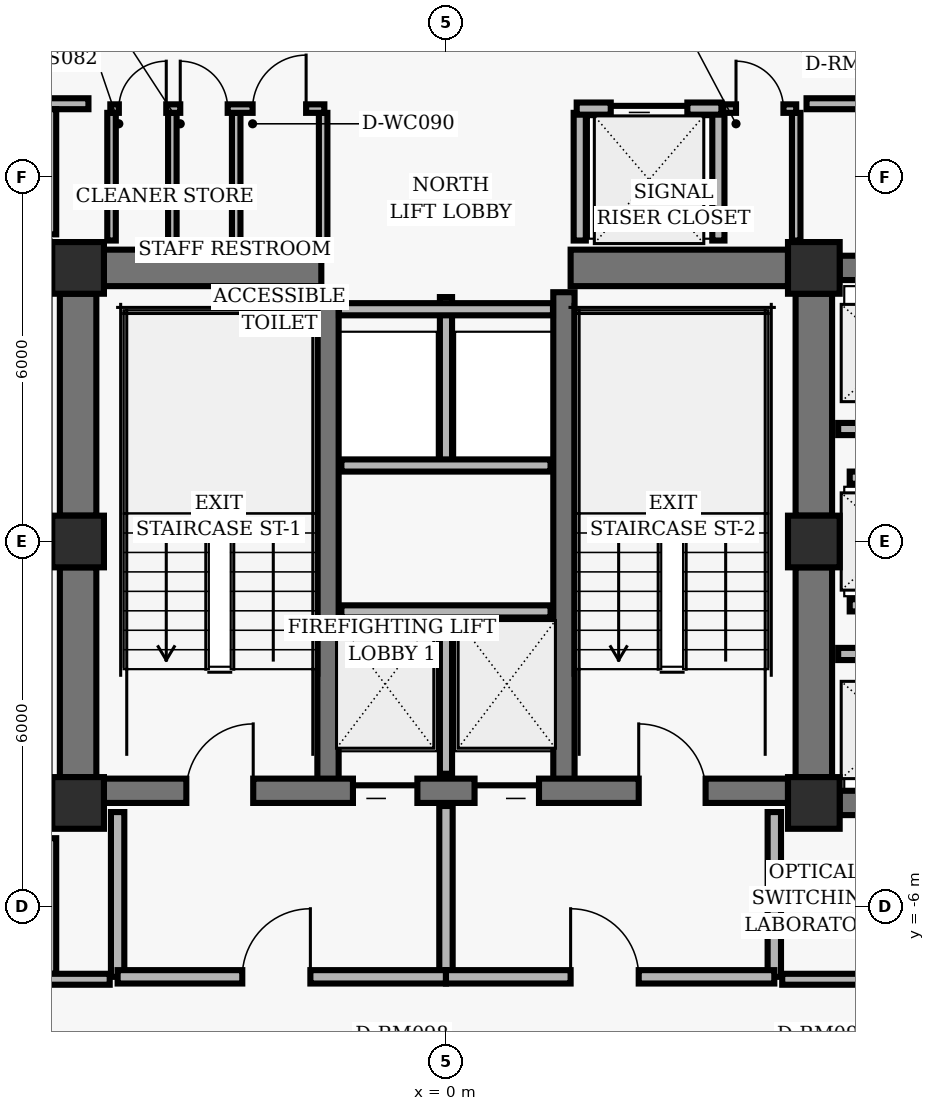
"""IFC4 building model, lengths in metres.
Left out: names, types, materials, properties, quantities, classifications, styles, units other than length and angle.
Written with IfcOpenShell. Run it as: python <this file> out.ifc"""

import sys

from ifc_helpers import new_model, si_unit, direction, frame, frame_2d, origin, origin_2d, place, context, subcontext, project, spatial, rectangle, hollow_rectangle, extrude, element, fill, save


model = new_model("IFC4")
c1 = context("Model", 3, precision=1e-05, world=origin(), true_north=direction((0.0, 1.0)))
c2 = subcontext(c1, "Body", "Model", "MODEL_VIEW")
j1 = project(units=[si_unit("LENGTHUNIT", "METRE"), si_unit("PLANEANGLEUNIT", "RADIAN")], contexts=[c1])
p1 = place(None, origin())
s1 = spatial("IfcSite", under=j1, at=p1, CompositionType="ELEMENT")
p2 = place(p1, origin())
s2 = spatial("IfcBuilding", under=s1, at=p2, CompositionType="ELEMENT")
p3 = place(p2, frame((0.0, 0.0, 147.2)))
s3 = spatial("IfcBuildingStorey", under=s2, at=p3, CompositionType="ELEMENT", Elevation=147.2)
for number, where, z_axis, x_axis in (
    (1, (-6.05, 4.5, 0.0), (0.0, 0.0, 1.0), (1.0, 0.0, 0.0)),
    (2, (6.05, 4.5, 0.0), (0.0, 0.0, 1.0), (1.0, 0.0, 0.0)),
    (3, (-6.05, 0.0, 0.0), (0.0, 0.0, 1.0), (1.0, 0.0, 0.0)),
    (4, (6.05, 0.0, 0.0), (0.0, 0.0, 1.0), (1.0, 0.0, 0.0)),
    (5, (-6.05, -4.3, 0.0), (0.0, 0.0, 1.0), (1.0, 0.0, 0.0)),
    (6, (6.05, -4.3, 0.0), (0.0, 0.0, 1.0), (1.0, 0.0, 0.0)),
):
    element("IfcColumn", number, at=place(p3, frame(where, z_axis=z_axis, x_axis=x_axis)), inside=s3, PredefinedType="COLUMN", context=c2, shape_type="SweptSolid", body=[
        extrude(hollow_rectangle(XDim=0.85, YDim=0.85, WallThickness=0.055, InnerFilletRadius=0.02, OuterFilletRadius=0.04, at=origin_2d()), origin(), (0.0, 0.0, 1.0), 3.04),
    ])
p4 = place(p3, frame((-6.05, 0.425, 0.0), z_axis=(0.0, 0.0, 1.0), x_axis=(0.0, 1.0, 0.0)))
e7 = element("IfcWall", 7, at=p4, inside=s3, PredefinedType="SHEAR", context=c2, shape_type="SweptSolid", body=[
    extrude(rectangle(XDim=3.65, YDim=0.6, at=frame_2d((1.825, 0.0))), origin(), (0.0, 0.0, 1.0), 2.788),
])
p5 = place(p3, frame((-6.05, -3.875, 0.0), z_axis=(0.0, 0.0, 1.0), x_axis=(0.0, 1.0, 0.0)))
e8 = element("IfcWall", 8, at=p5, inside=s3, PredefinedType="SHEAR", context=c2, shape_type="SweptSolid", body=[
    extrude(rectangle(XDim=3.45, YDim=0.6, at=frame_2d((1.725, 0.0))), origin(), (0.0, 0.0, 1.0), 2.788),
])
p6 = place(p3, frame((6.05, 0.425, 0.0), z_axis=(0.0, 0.0, 1.0), x_axis=(0.0, 1.0, 0.0)))
e9 = element("IfcWall", 9, at=p6, inside=s3, PredefinedType="SHEAR", context=c2, shape_type="SweptSolid", body=[
    extrude(rectangle(XDim=3.65, YDim=0.6, at=frame_2d((1.825, 0.0))), origin(), (0.0, 0.0, 1.0), 2.788),
])
p7 = place(p3, frame((6.05, -3.875, 0.0), z_axis=(0.0, 0.0, 1.0), x_axis=(0.0, 1.0, 0.0)))
e10 = element("IfcWall", 10, at=p7, inside=s3, PredefinedType="SHEAR", context=c2, shape_type="SweptSolid", body=[
    extrude(rectangle(XDim=3.45, YDim=0.6, at=frame_2d((1.725, 0.0))), origin(), (0.0, 0.0, 1.0), 2.788),
])
for number, where, z_axis, x_axis in (
    (11, (-1.94, -4.1, 0.0), (0.0, 0.0, 1.0), (0.0, 1.0, 0.0)),
    (12, (1.94, -4.1, 0.0), (0.0, 0.0, 1.0), (0.0, 1.0, 0.0)),
):
    element("IfcWall", number, at=place(p3, frame(where, z_axis=z_axis, x_axis=x_axis)), inside=s3, PredefinedType="SHEAR", context=c2, shape_type="SweptSolid", body=[
        extrude(rectangle(XDim=8.2, YDim=0.35, at=frame_2d((4.1, 0.0))), origin(), (0.0, 0.0, 1.0), 2.788),
    ])
p8 = place(p3, frame((-5.625, -4.1, 0.0), z_axis=(0.0, 0.0, 1.0), x_axis=(1.0, 0.0, 0.0)))
e13 = element("IfcWall", 13, at=p8, inside=s3, PredefinedType="SHEAR", context=c2, shape_type="SweptSolid", body=[
    extrude(rectangle(XDim=11.25, YDim=0.4, at=frame_2d((5.625, 0.0))), origin(), (0.0, 0.0, 1.0), 2.788),
])
p9 = place(p8, frame((1.355, 0.0, 0.0)))
e14 = element("IfcOpeningElement", 14, at=p9, cuts=e13, PredefinedType="OPENING", context=c2, shape_type="SweptSolid", body=[
    extrude(rectangle(XDim=1.1, YDim=2.04, at=frame_2d((0.55, 1.02))), frame((0.0, 0.21, 0.0), z_axis=(0.0, -1.0, 0.0), x_axis=(1.0, 0.0, 0.0)), (0.0, 0.0, 1.0), 0.42),
])
p10 = place(p8, frame((8.795, 0.0, 0.0)))
e15 = element("IfcOpeningElement", 15, at=p10, cuts=e13, PredefinedType="OPENING", context=c2, shape_type="SweptSolid", body=[
    extrude(rectangle(XDim=1.1, YDim=2.04, at=frame_2d((0.55, 1.02))), frame((0.0, 0.21, 0.0), z_axis=(0.0, -1.0, 0.0), x_axis=(1.0, 0.0, 0.0)), (0.0, 0.0, 1.0), 0.42),
])
p11 = place(p8, frame((4.095, 0.0, 0.0)))
e16 = element("IfcOpeningElement", 16, at=p11, cuts=e13, PredefinedType="OPENING", context=c2, shape_type="SweptSolid", body=[
    extrude(rectangle(XDim=1.06, YDim=2.04, at=frame_2d((0.53, 1.02))), frame((0.0, 0.21, 0.0), z_axis=(0.0, -1.0, 0.0), x_axis=(1.0, 0.0, 0.0)), (0.0, 0.0, 1.0), 0.42),
])
p12 = place(p8, frame((6.095, 0.0, 0.0)))
e17 = element("IfcOpeningElement", 17, at=p12, cuts=e13, PredefinedType="OPENING", context=c2, shape_type="SweptSolid", body=[
    extrude(rectangle(XDim=1.06, YDim=2.04, at=frame_2d((0.53, 1.02))), frame((0.0, 0.21, 0.0), z_axis=(0.0, -1.0, 0.0), x_axis=(1.0, 0.0, 0.0)), (0.0, 0.0, 1.0), 0.42),
])
for number, where, z_axis, x_axis in (
    (18, (-5.625, 4.5, 0.0), (0.0, 0.0, 1.0), (1.0, 0.0, 0.0)),
    (19, (2.05, 4.5, 0.0), (0.0, 0.0, 1.0), (1.0, 0.0, 0.0)),
):
    element("IfcWall", number, at=place(p3, frame(where, z_axis=z_axis, x_axis=x_axis)), inside=s3, PredefinedType="SHEAR", context=c2, shape_type="SweptSolid", body=[
        extrude(rectangle(XDim=3.575, YDim=0.6, at=frame_2d((1.788, 0.0))), origin(), (0.0, 0.0, 1.0), 2.788),
    ])
for number, where, z_axis, x_axis in (
    (20, (6.475, 4.5, 0.0), (0.0, 0.0, 1.0), (1.0, 0.0, 0.0)),
    (21, (6.475, -4.3, 0.0), (0.0, 0.0, 1.0), (1.0, 0.0, 0.0)),
):
    element("IfcWall", number, at=place(p3, frame(where, z_axis=z_axis, x_axis=x_axis)), inside=s3, PredefinedType="SHEAR", context=c2, shape_type="SweptSolid", body=[
        extrude(rectangle(XDim=2.05, YDim=0.4, at=frame_2d((1.025, 0.0))), origin(), (0.0, 0.0, 1.0), 2.788),
    ])
p13 = place(p3, frame((0.0, -3.82, 0.0), z_axis=(0.0, 0.0, 1.0), x_axis=(0.0, 1.0, 0.0)))
e22 = element("IfcWall", 22, at=p13, inside=s3, PredefinedType="PARTITIONING", context=c2, shape_type="SweptSolid", body=[
    extrude(rectangle(XDim=2.67, YDim=0.2, at=frame_2d((1.335, 0.0))), origin(), (0.0, 0.0, 1.0), 2.763),
])
p14 = place(p3, frame((-1.72, -1.15, 0.0), z_axis=(0.0, 0.0, 1.0), x_axis=(1.0, 0.0, 0.0)))
e23 = element("IfcWall", 23, at=p14, inside=s3, PredefinedType="PARTITIONING", context=c2, shape_type="SweptSolid", body=[
    extrude(rectangle(XDim=3.44, YDim=0.2, at=frame_2d((1.72, 0.0))), origin(), (0.0, 0.0, 1.0), 2.763),
])
for number, where, z_axis, x_axis in (
    (24, (-5.4, -7.16, 0.0), (0.0, 0.0, 1.0), (0.0, 1.0, 0.0)),
    (25, (5.4, -7.16, 0.0), (0.0, 0.0, 1.0), (0.0, 1.0, 0.0)),
):
    element("IfcWall", number, at=place(p3, frame(where, z_axis=z_axis, x_axis=x_axis)), inside=s3, PredefinedType="PARTITIONING", context=c2, shape_type="SweptSolid", body=[
        extrude(rectangle(XDim=2.71, YDim=0.22, at=frame_2d((1.355, 0.0))), origin(), (0.0, 0.0, 1.0), 2.763),
    ])
p15 = place(p3, frame((0.0, -7.16, 0.0), z_axis=(0.0, 0.0, 1.0), x_axis=(0.0, 1.0, 0.0)))
e26 = element("IfcWall", 26, at=p15, inside=s3, PredefinedType="PARTITIONING", context=c2, shape_type="SweptSolid", body=[
    extrude(rectangle(XDim=2.81, YDim=0.22, at=frame_2d((1.405, 0.0))), origin(), (0.0, 0.0, 1.0), 2.763),
])
p16 = place(p3, frame((-5.4, -7.16, 0.0), z_axis=(0.0, 0.0, 1.0), x_axis=(1.0, 0.0, 0.0)))
e27 = element("IfcWall", 27, at=p16, inside=s3, PredefinedType="PARTITIONING", context=c2, shape_type="SweptSolid", body=[
    extrude(rectangle(XDim=5.4, YDim=0.22, at=frame_2d((2.7, 0.0))), origin(), (0.0, 0.0, 1.0), 2.33),
])
p17 = place(p16, frame((2.05, 0.0, 0.0)))
e28 = element("IfcOpeningElement", 28, at=p17, cuts=e27, PredefinedType="OPENING", context=c2, shape_type="SweptSolid", body=[
    extrude(rectangle(XDim=1.12, YDim=2.02, at=frame_2d((0.56, 1.01))), frame((0.0, 0.12, 0.0), z_axis=(0.0, -1.0, 0.0), x_axis=(1.0, 0.0, 0.0)), (0.0, 0.0, 1.0), 0.24),
])
p18 = place(p3, frame((0.0, -7.16, 0.0), z_axis=(0.0, 0.0, 1.0), x_axis=(1.0, 0.0, 0.0)))
e29 = element("IfcWall", 29, at=p18, inside=s3, PredefinedType="PARTITIONING", context=c2, shape_type="SweptSolid", body=[
    extrude(rectangle(XDim=5.4, YDim=0.22, at=frame_2d((2.7, 0.0))), origin(), (0.0, 0.0, 1.0), 2.33),
])
p19 = place(p18, frame((2.05, 0.0, 0.0)))
e30 = element("IfcOpeningElement", 30, at=p19, cuts=e29, PredefinedType="OPENING", context=c2, shape_type="SweptSolid", body=[
    extrude(rectangle(XDim=1.12, YDim=2.02, at=frame_2d((0.56, 1.01))), frame((0.0, 0.12, 0.0), z_axis=(0.0, -1.0, 0.0), x_axis=(1.0, 0.0, 0.0)), (0.0, 0.0, 1.0), 0.24),
])
p20 = place(p3, frame((0.0, 1.25, 0.0), z_axis=(0.0, 0.0, 1.0), x_axis=(0.0, 1.0, 0.0)))
e31 = element("IfcWall", 31, at=p20, inside=s3, PredefinedType="PARTITIONING", context=c2, shape_type="SweptSolid", body=[
    extrude(rectangle(XDim=2.77, YDim=0.2, at=frame_2d((1.385, 0.0))), origin(), (0.0, 0.0, 1.0), 2.763),
])
p21 = place(p3, frame((-1.72, 1.25, 0.0), z_axis=(0.0, 0.0, 1.0), x_axis=(1.0, 0.0, 0.0)))
e32 = element("IfcWall", 32, at=p21, inside=s3, PredefinedType="PARTITIONING", context=c2, shape_type="SweptSolid", body=[
    extrude(rectangle(XDim=3.44, YDim=0.2, at=frame_2d((1.72, 0.0))), origin(), (0.0, 0.0, 1.0), 2.763),
])
p22 = place(p3, frame((-1.76, 3.82, 0.0), z_axis=(0.0, 0.0, 1.0), x_axis=(1.0, 0.0, 0.0)))
e33 = element("IfcWall", 33, at=p22, inside=s3, PredefinedType="PARTITIONING", context=c2, shape_type="SweptSolid", body=[
    extrude(rectangle(XDim=3.52, YDim=0.2, at=frame_2d((1.76, 0.0))), origin(), (0.0, 0.0, 1.0), 2.763),
])
for number, where, z_axis, x_axis in (
    (34, (2.2, 4.95, 0.0), (0.0, 0.0, 1.0), (0.0, 1.0, 0.0)),
    (35, (4.48, 4.95, 0.0), (0.0, 0.0, 1.0), (0.0, 1.0, 0.0)),
):
    element("IfcWall", number, at=place(p3, frame(where, z_axis=z_axis, x_axis=x_axis)), inside=s3, PredefinedType="PARTITIONING", context=c2, shape_type="SweptSolid", body=[
        extrude(rectangle(XDim=2.1, YDim=0.2, at=frame_2d((1.05, 0.0))), origin(), (0.0, 0.0, 1.0), 2.763),
    ])
p23 = place(p3, frame((2.15, 7.12, 0.0), z_axis=(0.0, 0.0, 1.0), x_axis=(1.0, 0.0, 0.0)))
e36 = element("IfcWall", 36, at=p23, inside=s3, PredefinedType="PARTITIONING", context=c2, shape_type="SweptSolid", body=[
    extrude(rectangle(XDim=2.38, YDim=0.2, at=frame_2d((1.19, 0.0))), origin(), (0.0, 0.0, 1.0), 2.763),
])
p24 = place(p23, frame((0.56, 0.0, 0.0)))
e37 = element("IfcOpeningElement", 37, at=p24, cuts=e36, PredefinedType="OPENING", context=c2, shape_type="SweptSolid", body=[
    extrude(rectangle(XDim=1.26, YDim=2.06, at=frame_2d((0.63, 1.03))), frame((0.0, 0.11, 0.0), z_axis=(0.0, -1.0, 0.0), x_axis=(1.0, 0.0, 0.0)), (0.0, 0.0, 1.0), 0.22),
])
for number, where, z_axis, x_axis in (
    (38, (-5.5, 4.95, 0.0), (0.0, 0.0, 1.0), (0.0, 1.0, 0.0)),
    (39, (-4.5, 4.95, 0.0), (0.0, 0.0, 1.0), (0.0, 1.0, 0.0)),
    (40, (-3.45, 4.95, 0.0), (0.0, 0.0, 1.0), (0.0, 1.0, 0.0)),
    (41, (-2.02, 4.95, 0.0), (0.0, 0.0, 1.0), (0.0, 1.0, 0.0)),
):
    element("IfcWall", number, at=place(p3, frame(where, z_axis=z_axis, x_axis=x_axis)), inside=s3, PredefinedType="PARTITIONING", context=c2, shape_type="SweptSolid", body=[
        extrude(rectangle(XDim=2.1, YDim=0.14, at=frame_2d((1.05, 0.0))), origin(), (0.0, 0.0, 1.0), 2.763),
    ])
p25 = place(p3, frame((-5.52, 7.12, 0.0), z_axis=(0.0, 0.0, 1.0), x_axis=(1.0, 0.0, 0.0)))
e42 = element("IfcWall", 42, at=p25, inside=s3, PredefinedType="PARTITIONING", context=c2, shape_type="SweptSolid", body=[
    extrude(rectangle(XDim=3.52, YDim=0.14, at=frame_2d((1.76, 0.0))), origin(), (0.0, 0.0, 1.0), 2.763),
])
p26 = place(p25, frame((0.14, 0.0, 0.0)))
e43 = element("IfcOpeningElement", 43, at=p26, cuts=e42, PredefinedType="OPENING", context=c2, shape_type="SweptSolid", body=[
    extrude(rectangle(XDim=0.78, YDim=2.01, at=frame_2d((0.39, 1.005))), frame((0.0, 0.08, 0.0), z_axis=(0.0, -1.0, 0.0), x_axis=(1.0, 0.0, 0.0)), (0.0, 0.0, 1.0), 0.16),
])
p27 = place(p25, frame((1.15, 0.0, 0.0)))
e44 = element("IfcOpeningElement", 44, at=p27, cuts=e42, PredefinedType="OPENING", context=c2, shape_type="SweptSolid", body=[
    extrude(rectangle(XDim=0.78, YDim=2.01, at=frame_2d((0.39, 1.005))), frame((0.0, 0.08, 0.0), z_axis=(0.0, -1.0, 0.0), x_axis=(1.0, 0.0, 0.0)), (0.0, 0.0, 1.0), 0.16),
])
p28 = place(p25, frame((2.34, 0.0, 0.0)))
e45 = element("IfcOpeningElement", 45, at=p28, cuts=e42, PredefinedType="OPENING", context=c2, shape_type="SweptSolid", body=[
    extrude(rectangle(XDim=0.88, YDim=2.02, at=frame_2d((0.44, 1.01))), frame((0.0, 0.08, 0.0), z_axis=(0.0, -1.0, 0.0), x_axis=(1.0, 0.0, 0.0)), (0.0, 0.0, 1.0), 0.16),
])
p29 = place(p3, frame((5.76, 4.95, 0.0), z_axis=(0.0, 0.0, 1.0), x_axis=(0.0, 1.0, 0.0)))
e46 = element("IfcWall", 46, at=p29, inside=s3, PredefinedType="PARTITIONING", context=c2, shape_type="SweptSolid", body=[
    extrude(rectangle(XDim=2.1, YDim=0.14, at=frame_2d((1.05, 0.0))), origin(), (0.0, 0.0, 1.0), 2.763),
])
p30 = place(p3, frame((4.56, 7.12, 0.0), z_axis=(0.0, 0.0, 1.0), x_axis=(1.0, 0.0, 0.0)))
e47 = element("IfcWall", 47, at=p30, inside=s3, PredefinedType="PARTITIONING", context=c2, shape_type="SweptSolid", body=[
    extrude(rectangle(XDim=1.2, YDim=0.14, at=frame_2d((0.6, 0.0))), origin(), (0.0, 0.0, 1.0), 2.763),
])
p31 = place(p30, frame((0.21, 0.0, 0.0)))
e48 = element("IfcOpeningElement", 48, at=p31, cuts=e47, PredefinedType="OPENING", context=c2, shape_type="SweptSolid", body=[
    extrude(rectangle(XDim=0.78, YDim=2.01, at=frame_2d((0.39, 1.005))), frame((0.0, 0.08, 0.0), z_axis=(0.0, -1.0, 0.0), x_axis=(1.0, 0.0, 0.0)), (0.0, 0.0, 1.0), 0.16),
])
for number, where, z_axis, x_axis in (
    (49, (6.45, -1.85, 0.0), (0.0, 0.0, 1.0), (1.0, 0.0, 0.0)),
    (50, (6.45, 1.85, 0.0), (0.0, 0.0, 1.0), (1.0, 0.0, 0.0)),
):
    element("IfcWall", number, at=place(p3, frame(where, z_axis=z_axis, x_axis=x_axis)), inside=s3, PredefinedType="PARTITIONING", context=c2, shape_type="SweptSolid", body=[
        extrude(rectangle(XDim=2.1, YDim=0.2, at=frame_2d((1.05, 0.0))), origin(), (0.0, 0.0, 1.0), 2.763),
    ])
for number, where, z_axis, x_axis in (
    (51, (6.64, -1.05, 0.0), (0.0, 0.0, 1.0), (1.0, 0.0, 0.0)),
    (52, (6.64, 1.05, 0.0), (0.0, 0.0, 1.0), (1.0, 0.0, 0.0)),
):
    element("IfcWall", number, at=place(p3, frame(where, z_axis=z_axis, x_axis=x_axis)), inside=s3, PredefinedType="PARTITIONING", context=c2, shape_type="SweptSolid", body=[
        extrude(rectangle(XDim=1.91, YDim=0.2, at=frame_2d((0.955, 0.0))), origin(), (0.0, 0.0, 1.0), 2.763),
    ])
p32 = place(p3, frame((10.814, 7.2, 0.0), z_axis=(0.0, 0.0, 1.0), x_axis=(-1.0, 0.0, 0.0)))
e53 = element("IfcWall", 53, at=p32, inside=s3, PredefinedType="PARTITIONING", context=c2, shape_type="SweptSolid", body=[
    extrude(rectangle(XDim=4.884, YDim=0.18, at=frame_2d((2.442, 0.0))), origin(), (0.0, 0.0, 1.0), 2.763),
])
p33 = place(p3, frame((-5.88, 7.2, 0.0), z_axis=(0.0, 0.0, 1.0), x_axis=(-1.0, 0.0, 0.0)))
e54 = element("IfcWall", 54, at=p33, inside=s3, PredefinedType="PARTITIONING", context=c2, shape_type="SweptSolid", body=[
    extrude(rectangle(XDim=0.71, YDim=0.18, at=frame_2d((0.355, 0.0))), origin(), (0.0, 0.0, 1.0), 2.763),
])
p34 = place(p3, frame((-6.5, 7.11, 0.0), z_axis=(0.0, 0.0, 1.0), x_axis=(0.0, -1.0, 0.0)))
e55 = element("IfcWall", 55, at=p34, inside=s3, PredefinedType="PARTITIONING", context=c2, shape_type="SweptSolid", body=[
    extrude(rectangle(XDim=2.058, YDim=0.18, at=frame_2d((1.029, 0.0))), origin(), (0.0, 0.0, 1.0), 2.763),
])
p35 = place(p3, frame((-6.5, -4.88, 0.0), z_axis=(0.0, 0.0, 1.0), x_axis=(0.0, -1.0, 0.0)))
e56 = element("IfcWall", 56, at=p35, inside=s3, PredefinedType="PARTITIONING", context=c2, shape_type="SweptSolid", body=[
    extrude(rectangle(XDim=2.23, YDim=0.18, at=frame_2d((1.115, 0.0))), origin(), (0.0, 0.0, 1.0), 2.763),
])
p36 = place(p3, frame((-6.59, -7.2, 0.0), z_axis=(0.0, 0.0, 1.0), x_axis=(1.0, 0.0, 0.0)))
e57 = element("IfcWall", 57, at=p36, inside=s3, PredefinedType="PARTITIONING", context=c2, shape_type="SweptSolid", body=[
    extrude(rectangle(XDim=1.06, YDim=0.18, at=frame_2d((0.53, 0.0))), origin(), (0.0, 0.0, 1.0), 2.763),
])
p37 = place(p3, frame((5.53, -7.2, 0.0), z_axis=(0.0, 0.0, 1.0), x_axis=(1.0, 0.0, 0.0)))
e58 = element("IfcWall", 58, at=p37, inside=s3, PredefinedType="PARTITIONING", context=c2, shape_type="SweptSolid", body=[
    extrude(rectangle(XDim=5.52, YDim=0.18, at=frame_2d((2.76, 0.0))), origin(), (0.0, 0.0, 1.0), 2.33),
])
p38 = place(p37, frame((2.25, 0.0, 0.0)))
e59 = element("IfcOpeningElement", 59, at=p38, cuts=e58, PredefinedType="OPENING", context=c2, shape_type="SweptSolid", body=[
    extrude(rectangle(XDim=1.02, YDim=2.02, at=frame_2d((0.51, 1.01))), frame((0.0, 0.1, 0.0), z_axis=(0.0, -1.0, 0.0), x_axis=(1.0, 0.0, 0.0)), (0.0, 0.0, 1.0), 0.2),
])
p39 = place(p9, origin())
e60 = element("IfcDoor", 60, at=p39, inside=s3, OperationType="SINGLE_SWING_RIGHT", PredefinedType="DOOR", context=c2, shape_type="SweptSolid", body=[
    extrude(rectangle(XDim=1.1, YDim=2.04, at=frame_2d((0.55, 1.02))), frame((0.0, 0.025, 0.0), z_axis=(0.0, -1.0, 0.0), x_axis=(1.0, 0.0, 0.0)), (0.0, 0.0, 1.0), 0.05),
])
fill(e14, e60)
p40 = place(p10, origin())
e61 = element("IfcDoor", 61, at=p40, inside=s3, OperationType="SINGLE_SWING_LEFT", PredefinedType="DOOR", context=c2, shape_type="SweptSolid", body=[
    extrude(rectangle(XDim=1.1, YDim=2.04, at=frame_2d((0.55, 1.02))), frame((0.0, 0.025, 0.0), z_axis=(0.0, -1.0, 0.0), x_axis=(1.0, 0.0, 0.0)), (0.0, 0.0, 1.0), 0.05),
])
fill(e15, e61)
p41 = place(p11, origin())
e62 = element("IfcDoor", 62, at=p41, inside=s3, OperationType="SLIDING_TO_LEFT", PredefinedType="DOOR", context=c2, shape_type="SweptSolid", body=[
    extrude(rectangle(XDim=1.06, YDim=2.04, at=frame_2d((0.53, 1.02))), frame((0.0, 0.025, 0.0), z_axis=(0.0, -1.0, 0.0), x_axis=(1.0, 0.0, 0.0)), (0.0, 0.0, 1.0), 0.05),
])
fill(e16, e62)
p42 = place(p12, origin())
e63 = element("IfcDoor", 63, at=p42, inside=s3, OperationType="SLIDING_TO_RIGHT", PredefinedType="DOOR", context=c2, shape_type="SweptSolid", body=[
    extrude(rectangle(XDim=1.06, YDim=2.04, at=frame_2d((0.53, 1.02))), frame((0.0, 0.025, 0.0), z_axis=(0.0, -1.0, 0.0), x_axis=(1.0, 0.0, 0.0)), (0.0, 0.0, 1.0), 0.05),
])
fill(e17, e63)
p43 = place(p17, origin())
e64 = element("IfcDoor", 64, at=p43, inside=s3, OperationType="SINGLE_SWING_RIGHT", PredefinedType="DOOR", context=c2, shape_type="SweptSolid", body=[
    extrude(rectangle(XDim=1.12, YDim=2.02, at=frame_2d((0.56, 1.01))), frame((0.0, 0.025, 0.0), z_axis=(0.0, -1.0, 0.0), x_axis=(1.0, 0.0, 0.0)), (0.0, 0.0, 1.0), 0.05),
])
fill(e28, e64)
p44 = place(p19, origin())
e65 = element("IfcDoor", 65, at=p44, inside=s3, OperationType="SINGLE_SWING_LEFT", PredefinedType="DOOR", context=c2, shape_type="SweptSolid", body=[
    extrude(rectangle(XDim=1.12, YDim=2.02, at=frame_2d((0.56, 1.01))), frame((0.0, 0.025, 0.0), z_axis=(0.0, -1.0, 0.0), x_axis=(1.0, 0.0, 0.0)), (0.0, 0.0, 1.0), 0.05),
])
fill(e30, e65)
p45 = place(p24, origin())
e66 = element("IfcDoor", 66, at=p45, inside=s3, OperationType="SLIDING_TO_LEFT", PredefinedType="DOOR", context=c2, shape_type="SweptSolid", body=[
    extrude(rectangle(XDim=1.26, YDim=2.06, at=frame_2d((0.63, 1.03))), frame((0.0, 0.025, 0.0), z_axis=(0.0, -1.0, 0.0), x_axis=(1.0, 0.0, 0.0)), (0.0, 0.0, 1.0), 0.05),
])
fill(e37, e66)
p46 = place(p26, origin())
e67 = element("IfcDoor", 67, at=p46, inside=s3, OperationType="SINGLE_SWING_RIGHT", PredefinedType="DOOR", context=c2, shape_type="SweptSolid", body=[
    extrude(rectangle(XDim=0.78, YDim=2.01, at=frame_2d((0.39, 1.005))), frame((0.0, 0.025, 0.0), z_axis=(0.0, -1.0, 0.0), x_axis=(1.0, 0.0, 0.0)), (0.0, 0.0, 1.0), 0.05),
])
fill(e43, e67)
p47 = place(p27, origin())
e68 = element("IfcDoor", 68, at=p47, inside=s3, OperationType="SINGLE_SWING_LEFT", PredefinedType="DOOR", context=c2, shape_type="SweptSolid", body=[
    extrude(rectangle(XDim=0.78, YDim=2.01, at=frame_2d((0.39, 1.005))), frame((0.0, 0.025, 0.0), z_axis=(0.0, -1.0, 0.0), x_axis=(1.0, 0.0, 0.0)), (0.0, 0.0, 1.0), 0.05),
])
fill(e44, e68)
p48 = place(p28, origin())
e69 = element("IfcDoor", 69, at=p48, inside=s3, OperationType="SINGLE_SWING_RIGHT", PredefinedType="DOOR", context=c2, shape_type="SweptSolid", body=[
    extrude(rectangle(XDim=0.88, YDim=2.02, at=frame_2d((0.44, 1.01))), frame((0.0, 0.025, 0.0), z_axis=(0.0, -1.0, 0.0), x_axis=(1.0, 0.0, 0.0)), (0.0, 0.0, 1.0), 0.05),
])
fill(e45, e69)
p49 = place(p31, origin())
e70 = element("IfcDoor", 70, at=p49, inside=s3, OperationType="SINGLE_SWING_LEFT", PredefinedType="DOOR", context=c2, shape_type="SweptSolid", body=[
    extrude(rectangle(XDim=0.78, YDim=2.01, at=frame_2d((0.39, 1.005))), frame((0.0, 0.025, 0.0), z_axis=(0.0, -1.0, 0.0), x_axis=(1.0, 0.0, 0.0)), (0.0, 0.0, 1.0), 0.05),
])
fill(e48, e70)
save(model, sys.argv[1])
